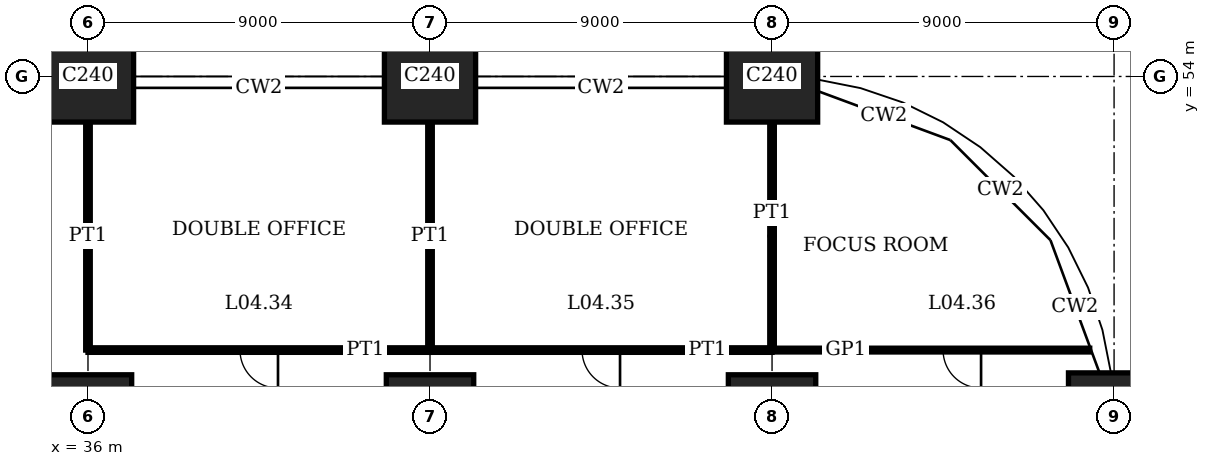
"""IFC4 building model, lengths in metres.
Left out: names, types, materials, properties, quantities, classifications, styles, units other than length and angle.
Written with IfcOpenShell. Run it as: python <this file> out.ifc"""

import sys

from ifc_helpers import new_model, si_unit, direction, frame, frame_2d, origin, origin_2d, place, context, subcontext, project, spatial, rectangle, extrude, element, fill, save


model = new_model("IFC4")
c1 = context("Model", 3, precision=1e-05, world=origin(), true_north=direction((0.0, 1.0)))
c2 = subcontext(c1, "Body", "Model", "MODEL_VIEW")
j1 = project(units=[si_unit("LENGTHUNIT", "METRE"), si_unit("PLANEANGLEUNIT", "RADIAN")], contexts=[c1])
p1 = place(None, origin())
s1 = spatial("IfcSite", under=j1, at=p1, CompositionType="ELEMENT")
p2 = place(p1, origin())
s2 = spatial("IfcBuilding", under=s1, at=p2, CompositionType="ELEMENT")
p3 = place(p2, frame((0.0, 0.0, 19.8)))
s3 = spatial("IfcBuildingStorey", under=s2, at=p3, CompositionType="ELEMENT", Elevation=19.8)
p4 = place(p3, frame((36.0, 45.0, 0.0), z_axis=(0.0, 0.0, 1.0), x_axis=(1.0, 0.0, 0.0)))
e1 = element("IfcColumn", 1, at=p4, inside=s3, PredefinedType="COLUMN", context=c2, shape_type="SweptSolid", body=[
    extrude(rectangle(XDim=2.3, YDim=2.3, at=origin_2d()), origin(), (0.0, 0.0, 1.0), 4.0),
])
p5 = place(p3, frame((36.0, 54.0, 0.0), z_axis=(0.0, 0.0, 1.0), x_axis=(1.0, 0.0, 0.0)))
e2 = element("IfcColumn", 2, at=p5, inside=s3, PredefinedType="COLUMN", context=c2, shape_type="SweptSolid", body=[
    extrude(rectangle(XDim=2.4, YDim=2.4, at=origin_2d()), origin(), (0.0, 0.0, 1.0), 4.0),
])
p6 = place(p3, frame((45.0, 45.0, 0.0), z_axis=(0.0, 0.0, 1.0), x_axis=(1.0, 0.0, 0.0)))
e3 = element("IfcColumn", 3, at=p6, inside=s3, PredefinedType="COLUMN", context=c2, shape_type="SweptSolid", body=[
    extrude(rectangle(XDim=2.3, YDim=2.3, at=origin_2d()), origin(), (0.0, 0.0, 1.0), 4.0),
])
p7 = place(p3, frame((45.0, 54.0, 0.0), z_axis=(0.0, 0.0, 1.0), x_axis=(1.0, 0.0, 0.0)))
e4 = element("IfcColumn", 4, at=p7, inside=s3, PredefinedType="COLUMN", context=c2, shape_type="SweptSolid", body=[
    extrude(rectangle(XDim=2.4, YDim=2.4, at=origin_2d()), origin(), (0.0, 0.0, 1.0), 4.0),
])
p8 = place(p3, frame((54.0, 45.0, 0.0), z_axis=(0.0, 0.0, 1.0), x_axis=(1.0, 0.0, 0.0)))
e5 = element("IfcColumn", 5, at=p8, inside=s3, PredefinedType="COLUMN", context=c2, shape_type="SweptSolid", body=[
    extrude(rectangle(XDim=2.3, YDim=2.3, at=origin_2d()), origin(), (0.0, 0.0, 1.0), 4.0),
])
for number, where, z_axis, x_axis in (
    (6, (54.0, 54.0, 0.0), (0.0, 0.0, 1.0), (1.0, 0.0, 0.0)),
    (7, (63.0, 45.0, 0.0), (0.0, 0.0, 1.0), (1.0, 0.0, 0.0)),
):
    element("IfcColumn", number, at=place(p3, frame(where, z_axis=z_axis, x_axis=x_axis)), inside=s3, PredefinedType="COLUMN", context=c2, shape_type="SweptSolid", body=[
        extrude(rectangle(XDim=2.4, YDim=2.4, at=origin_2d()), origin(), (0.0, 0.0, 1.0), 4.0),
    ])
p9 = place(p3, frame((36.0, 46.8, 0.0), z_axis=(0.0, 0.0, 1.0), x_axis=(1.0, 0.0, 0.0)))
e8 = element("IfcWall", 8, at=p9, inside=s3, PredefinedType="PARTITIONING", context=c2, shape_type="SweptSolid", body=[
    extrude(rectangle(XDim=9.0, YDim=0.12, at=frame_2d((4.5, 0.0))), origin(), (0.0, 0.0, 1.0), 3.75),
])
p10 = place(p9, frame((4.0, 0.0, 0.0)))
e9 = element("IfcOpeningElement", 9, at=p10, cuts=e8, PredefinedType="OPENING", context=c2, shape_type="SweptSolid", body=[
    extrude(rectangle(XDim=1.0, YDim=2.4, at=frame_2d((0.5, 1.2))), frame((0.0, 0.07, 0.0), z_axis=(0.0, -1.0, 0.0), x_axis=(1.0, 0.0, 0.0)), (0.0, 0.0, 1.0), 0.14),
])
p11 = place(p3, frame((45.0, 46.8, 0.0), z_axis=(0.0, 0.0, 1.0), x_axis=(1.0, 0.0, 0.0)))
e10 = element("IfcWall", 10, at=p11, inside=s3, PredefinedType="PARTITIONING", context=c2, shape_type="SweptSolid", body=[
    extrude(rectangle(XDim=9.0, YDim=0.12, at=frame_2d((4.5, 0.0))), origin(), (0.0, 0.0, 1.0), 3.75),
])
p12 = place(p11, frame((4.0, 0.0, 0.0)))
e11 = element("IfcOpeningElement", 11, at=p12, cuts=e10, PredefinedType="OPENING", context=c2, shape_type="SweptSolid", body=[
    extrude(rectangle(XDim=1.0, YDim=2.4, at=frame_2d((0.5, 1.2))), frame((0.0, 0.07, 0.0), z_axis=(0.0, -1.0, 0.0), x_axis=(1.0, 0.0, 0.0)), (0.0, 0.0, 1.0), 0.14),
])
p13 = place(p3, frame((54.0, 46.8, 0.0), z_axis=(0.0, 0.0, 1.0), x_axis=(1.0, 0.0, 0.0)))
e12 = element("IfcWall", 12, at=p13, inside=s3, PredefinedType="PARTITIONING", context=c2, shape_type="SweptSolid", body=[
    extrude(rectangle(XDim=8.359, YDim=0.1, at=frame_2d((4.18, 0.0))), origin(), (0.0, 0.0, 1.0), 3.75),
])
p14 = place(p13, frame((4.5, 0.0, 0.0)))
e13 = element("IfcOpeningElement", 13, at=p14, cuts=e12, PredefinedType="OPENING", context=c2, shape_type="SweptSolid", body=[
    extrude(rectangle(XDim=1.0, YDim=2.4, at=frame_2d((0.5, 1.2))), frame((0.0, 0.06, 0.0), z_axis=(0.0, -1.0, 0.0), x_axis=(1.0, 0.0, 0.0)), (0.0, 0.0, 1.0), 0.12),
])
for number, where, z_axis, x_axis in (
    (14, (36.0, 46.8, 0.0), (0.0, 0.0, 1.0), (0.0, 1.0, 0.0)),
    (15, (45.0, 46.8, 0.0), (0.0, 0.0, 1.0), (0.0, 1.0, 0.0)),
    (16, (54.0, 46.8, 0.0), (0.0, 0.0, 1.0), (0.0, 1.0, 0.0)),
):
    element("IfcWall", number, at=place(p3, frame(where, z_axis=z_axis, x_axis=x_axis)), inside=s3, PredefinedType="PARTITIONING", context=c2, shape_type="SweptSolid", body=[
        extrude(rectangle(XDim=6.0, YDim=0.12, at=frame_2d((3.0, 0.0))), origin(), (0.0, 0.0, 1.0), 3.05),
    ])
p15 = place(p10, origin())
e17 = element("IfcDoor", 17, at=p15, inside=s3, OperationType="SINGLE_SWING_RIGHT", PredefinedType="DOOR", context=c2, shape_type="SweptSolid", body=[
    extrude(rectangle(XDim=1.0, YDim=2.4, at=frame_2d((0.5, 1.2))), frame((0.0, 0.025, 0.0), z_axis=(0.0, -1.0, 0.0), x_axis=(1.0, 0.0, 0.0)), (0.0, 0.0, 1.0), 0.05),
])
fill(e9, e17)
p16 = place(p12, origin())
e18 = element("IfcDoor", 18, at=p16, inside=s3, OperationType="SINGLE_SWING_RIGHT", PredefinedType="DOOR", context=c2, shape_type="SweptSolid", body=[
    extrude(rectangle(XDim=1.0, YDim=2.4, at=frame_2d((0.5, 1.2))), frame((0.0, 0.025, 0.0), z_axis=(0.0, -1.0, 0.0), x_axis=(1.0, 0.0, 0.0)), (0.0, 0.0, 1.0), 0.05),
])
fill(e11, e18)
p17 = place(p14, origin())
e19 = element("IfcDoor", 19, at=p17, inside=s3, OperationType="SINGLE_SWING_RIGHT", PredefinedType="DOOR", context=c2, shape_type="SweptSolid", body=[
    extrude(rectangle(XDim=1.0, YDim=2.4, at=frame_2d((0.5, 1.2))), frame((0.0, 0.02, 0.0), z_axis=(0.0, -1.0, 0.0), x_axis=(1.0, 0.0, 0.0)), (0.0, 0.0, 1.0), 0.04),
])
fill(e13, e19)
save(model, sys.argv[1])
